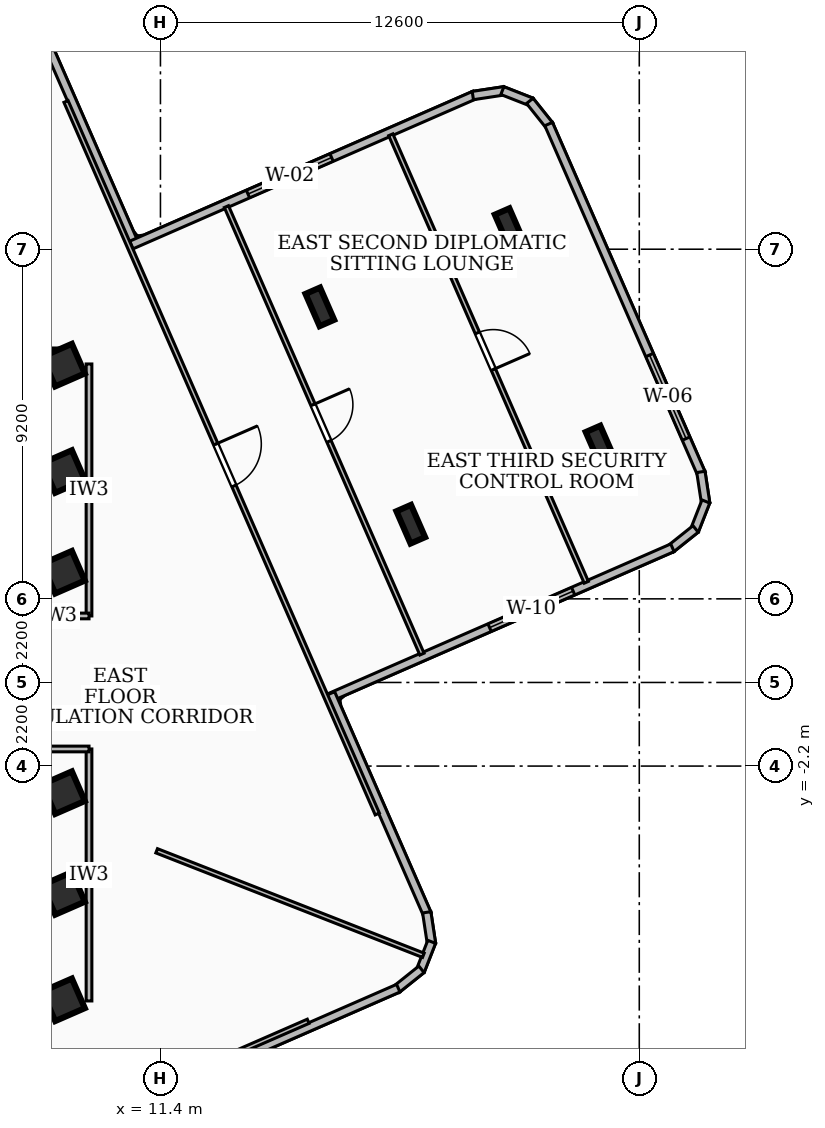
"""IFC4 building model, lengths in metres.
Left out: names, types, materials, properties, quantities, classifications, styles, units other than length and angle.
Written with IfcOpenShell. Run it as: python <this file> out.ifc"""

import sys

from ifc_helpers import new_model, si_unit, direction, frame, frame_2d, origin, origin_2d, place, context, subcontext, project, spatial, rectangle, i_section, extrude, element, fill, save


model = new_model("IFC4")
c1 = context("Model", 3, precision=1e-05, world=origin(), true_north=direction((0.0, 1.0)))
c2 = subcontext(c1, "Body", "Model", "MODEL_VIEW")
j1 = project(units=[si_unit("LENGTHUNIT", "METRE"), si_unit("PLANEANGLEUNIT", "RADIAN")], contexts=[c1])
p1 = place(None, origin())
s1 = spatial("IfcSite", under=j1, at=p1, CompositionType="ELEMENT")
p2 = place(p1, origin())
s2 = spatial("IfcBuilding", under=s1, at=p2, CompositionType="ELEMENT")
p3 = place(p2, frame((0.0, 0.0, 181.08)))
s3 = spatial("IfcBuildingStorey", under=s2, at=p3, CompositionType="ELEMENT", Elevation=181.08)
for number, where, z_axis, x_axis in (
    (1, (-8.78, 8.535, 0.0), (0.0, 0.0, 1.0), (1.0, 0.0, 0.0)),
    (2, (8.78, -8.535, 0.0), (0.0, 0.0, 1.0), (-1.0, 0.0, 0.0)),
):
    element("IfcWall", number, at=place(p3, frame(where, z_axis=z_axis, x_axis=x_axis)), inside=s3, PredefinedType="SHEAR", context=c2, shape_type="SweptSolid", body=[
        extrude(rectangle(XDim=17.56, YDim=0.45, at=frame_2d((8.78, 0.0))), origin(), (0.0, 0.0, 1.0), 3.34),
    ])
for number, where, z_axis, x_axis in (
    (3, (8.85, -5.55, 0.0), (0.0, 0.0, 1.0), (0.916, 0.4, 0.0)),
    (4, (8.85, -2.9, 0.0), (0.0, 0.0, 1.0), (0.916, 0.4, 0.0)),
    (5, (8.85, 2.9, 0.0), (0.0, 0.0, 1.0), (0.916, 0.4, 0.0)),
    (6, (8.85, 5.55, 0.0), (0.0, 0.0, 1.0), (0.916, 0.4, 0.0)),
    (7, (8.85, -8.35, 0.0), (0.0, 0.0, 1.0), (0.916, 0.4, 0.0)),
    (8, (8.85, 8.35, 0.0), (0.0, 0.0, 1.0), (0.916, 0.4, 0.0)),
):
    element("IfcColumn", number, at=place(p3, frame(where, z_axis=z_axis, x_axis=x_axis)), inside=s3, PredefinedType="COLUMN", context=c2, shape_type="SweptSolid", body=[
        extrude(rectangle(XDim=0.85, YDim=0.85, at=origin_2d()), origin(), (0.0, 0.0, 1.0), 3.6),
    ])
for number, where, z_axis, x_axis in (
    (9, (17.987, 4.164, 0.0), (0.0, 0.0, 1.0), (0.916, 0.4, 0.0)),
    (10, (15.594, 9.883, 0.0), (0.0, 0.0, 1.0), (0.916, 0.4, 0.0)),
    (11, (22.968, 6.248, 0.0), (0.0, 0.0, 1.0), (0.916, 0.4, 0.0)),
    (12, (20.576, 11.967, 0.0), (0.0, 0.0, 1.0), (0.916, 0.4, 0.0)),
):
    element("IfcColumn", number, at=place(p3, frame(where, z_axis=z_axis, x_axis=x_axis)), inside=s3, PredefinedType="COLUMN", context=c2, shape_type="SweptSolid", body=[
        extrude(i_section(OverallWidth=0.418, OverallDepth=0.927, WebThickness=0.019, FlangeThickness=0.032, at=origin_2d()), origin(), (0.0, 0.0, 1.0), 3.6),
    ])
p4 = place(p3, frame((8.044, 17.658, 0.0), z_axis=(0.0, 0.0, 1.0), x_axis=(0.400352658158, -0.916361145567, 0.0)))
e13 = element("IfcWall", 13, at=p4, inside=s3, PredefinedType="SOLIDWALL", context=c2, shape_type="SweptSolid", body=[
    extrude(rectangle(XDim=6.759, YDim=0.22, at=frame_2d((3.38, 0.0))), origin(), (0.0, 0.0, 1.0), 3.34),
])
p5 = place(p3, frame((10.634, 11.51, 0.0), z_axis=(0.0, 0.0, 1.0), x_axis=(0.916355581171, 0.400365394179, 0.0)))
e14 = element("IfcWall", 14, at=p5, inside=s3, PredefinedType="SOLIDWALL", context=c2, shape_type="SweptSolid", body=[
    extrude(rectangle(XDim=9.859, YDim=0.22, at=frame_2d((4.929, 0.0))), origin(), (0.0, 0.0, 1.0), 3.34),
])
p6 = place(p5, frame((3.35, 0.0, 0.85)))
e15 = element("IfcOpeningElement", 15, at=p6, cuts=e14, PredefinedType="OPENING", context=c2, shape_type="SweptSolid", body=[
    extrude(rectangle(XDim=2.4, YDim=2.1, at=frame_2d((1.2, 1.05))), frame((0.0, 0.12, 0.0), z_axis=(0.0, -1.0, 0.0), x_axis=(1.0, 0.0, 0.0)), (0.0, 0.0, 1.0), 0.24),
])
p7 = place(p3, frame((19.62, 15.443, 0.0), z_axis=(0.0, 0.0, 1.0), x_axis=(0.988714190876, 0.149814047271, 0.0)))
e16 = element("IfcWall", 16, at=p7, inside=s3, PredefinedType="SOLIDWALL", context=c2, shape_type="SweptSolid", body=[
    extrude(rectangle(XDim=0.834, YDim=0.22, at=frame_2d((0.417, 0.0))), origin(), (0.0, 0.0, 1.0), 3.34),
])
p8 = place(p3, frame((20.397, 15.573, 0.0), z_axis=(0.0, 0.0, 1.0), x_axis=(0.93086383185, -0.365366290938, 0.0)))
e17 = element("IfcWall", 17, at=p8, inside=s3, PredefinedType="SOLIDWALL", context=c2, shape_type="SweptSolid", body=[
    extrude(rectangle(XDim=0.819, YDim=0.22, at=frame_2d((0.409, 0.0))), origin(), (0.0, 0.0, 1.0), 3.34),
])
p9 = place(p3, frame((21.12, 15.303, 0.0), z_axis=(0.0, 0.0, 1.0), x_axis=(0.623625316731, -0.781723393747, 0.0)))
e18 = element("IfcWall", 18, at=p9, inside=s3, PredefinedType="SOLIDWALL", context=c2, shape_type="SweptSolid", body=[
    extrude(rectangle(XDim=0.835, YDim=0.22, at=frame_2d((0.418, 0.0))), origin(), (0.0, 0.0, 1.0), 3.34),
])
p10 = place(p3, frame((21.615, 14.693, 0.0), z_axis=(0.0, 0.0, 1.0), x_axis=(0.400359601754, -0.916358111921, 0.0)))
e19 = element("IfcWall", 19, at=p10, inside=s3, PredefinedType="SOLIDWALL", context=c2, shape_type="SweptSolid", body=[
    extrude(rectangle(XDim=10.041, YDim=0.22, at=frame_2d((5.021, 0.0))), origin(), (0.0, 0.0, 1.0), 3.34),
])
p11 = place(p10, frame((6.632, 0.0, 0.85)))
e20 = element("IfcOpeningElement", 20, at=p11, cuts=e19, PredefinedType="OPENING", context=c2, shape_type="SweptSolid", body=[
    extrude(rectangle(XDim=2.4, YDim=1.85, at=frame_2d((1.2, 0.925))), frame((0.0, 0.12, 0.0), z_axis=(0.0, -1.0, 0.0), x_axis=(1.0, 0.0, 0.0)), (0.0, 0.0, 1.0), 0.24),
])
p12 = place(p3, frame((25.621, 5.54, 0.0), z_axis=(0.0, 0.0, 1.0), x_axis=(0.150783469095, -0.988566813851, 0.0)))
e21 = element("IfcWall", 21, at=p12, inside=s3, PredefinedType="SOLIDWALL", context=c2, shape_type="SweptSolid", body=[
    extrude(rectangle(XDim=0.835, YDim=0.22, at=frame_2d((0.418, 0.0))), origin(), (0.0, 0.0, 1.0), 3.34),
])
p13 = place(p3, frame((25.752, 4.762, 0.0), z_axis=(0.0, 0.0, 1.0), x_axis=(-0.365366290938, -0.93086383185, 0.0)))
e22 = element("IfcWall", 22, at=p13, inside=s3, PredefinedType="SOLIDWALL", context=c2, shape_type="SweptSolid", body=[
    extrude(rectangle(XDim=0.819, YDim=0.22, at=frame_2d((0.409, 0.0))), origin(), (0.0, 0.0, 1.0), 3.34),
])
p14 = place(p3, frame((25.482, 4.039, 0.0), z_axis=(0.0, 0.0, 1.0), x_axis=(-0.781609702867, -0.62376780326, 0.0)))
e23 = element("IfcWall", 23, at=p14, inside=s3, PredefinedType="SOLIDWALL", context=c2, shape_type="SweptSolid", body=[
    extrude(rectangle(XDim=0.835, YDim=0.22, at=frame_2d((0.417, 0.0))), origin(), (0.0, 0.0, 1.0), 3.34),
])
p15 = place(p3, frame((24.872, 3.544, 0.0), z_axis=(0.0, 0.0, 1.0), x_axis=(-0.916375425493, -0.400319971464, 0.0)))
e24 = element("IfcWall", 24, at=p15, inside=s3, PredefinedType="SOLIDWALL", context=c2, shape_type="SweptSolid", body=[
    extrude(rectangle(XDim=9.86, YDim=0.22, at=frame_2d((4.93, 0.0))), origin(), (0.0, 0.0, 1.0), 3.34),
])
p16 = place(p15, frame((2.85, 0.0, 0.85)))
e25 = element("IfcOpeningElement", 25, at=p16, cuts=e24, PredefinedType="OPENING", context=c2, shape_type="SweptSolid", body=[
    extrude(rectangle(XDim=2.4, YDim=1.65, at=frame_2d((1.2, 0.825))), frame((0.0, 0.12, 0.0), z_axis=(0.0, -1.0, 0.0), x_axis=(1.0, 0.0, 0.0)), (0.0, 0.0, 1.0), 0.24),
])
p17 = place(p3, frame((15.883, -0.287, 0.0), z_axis=(0.0, 0.0, 1.0), x_axis=(0.400352069216, -0.916361402872, 0.0)))
e26 = element("IfcWall", 26, at=p17, inside=s3, PredefinedType="SOLIDWALL", context=c2, shape_type="SweptSolid", body=[
    extrude(rectangle(XDim=6.339, YDim=0.22, at=frame_2d((3.169, 0.0))), origin(), (0.0, 0.0, 1.0), 3.34),
])
p18 = place(p3, frame((18.407, -6.048, 0.0), z_axis=(0.0, 0.0, 1.0), x_axis=(0.149814047271, -0.988714190876, 0.0)))
e27 = element("IfcWall", 27, at=p18, inside=s3, PredefinedType="SOLIDWALL", context=c2, shape_type="SweptSolid", body=[
    extrude(rectangle(XDim=0.834, YDim=0.22, at=frame_2d((0.417, 0.0))), origin(), (0.0, 0.0, 1.0), 3.34),
])
p19 = place(p3, frame((18.537, -6.825, 0.0), z_axis=(0.0, 0.0, 1.0), x_axis=(-0.364331843435, -0.931269191941, 0.0)))
e28 = element("IfcWall", 28, at=p19, inside=s3, PredefinedType="SOLIDWALL", context=c2, shape_type="SweptSolid", body=[
    extrude(rectangle(XDim=0.818, YDim=0.22, at=frame_2d((0.409, 0.0))), origin(), (0.0, 0.0, 1.0), 3.34),
])
p20 = place(p3, frame((18.268, -7.548, 0.0), z_axis=(0.0, 0.0, 1.0), x_axis=(-0.781153625844, -0.624338860581, 0.0)))
e29 = element("IfcWall", 29, at=p20, inside=s3, PredefinedType="SOLIDWALL", context=c2, shape_type="SweptSolid", body=[
    extrude(rectangle(XDim=0.836, YDim=0.22, at=frame_2d((0.418, 0.0))), origin(), (0.0, 0.0, 1.0), 3.34),
])
p21 = place(p3, frame((17.658, -8.044, 0.0), z_axis=(0.0, 0.0, 1.0), x_axis=(-0.916361145567, -0.400352658158, 0.0)))
e30 = element("IfcWall", 30, at=p21, inside=s3, PredefinedType="SOLIDWALL", context=c2, shape_type="SweptSolid", body=[
    extrude(rectangle(XDim=6.759, YDim=0.22, at=frame_2d((3.38, 0.0))), origin(), (0.0, 0.0, 1.0), 3.34),
])
p22 = place(p3, frame((9.52, 1.75, 0.0), z_axis=(0.0, 0.0, 1.0), x_axis=(0.0, 1.0, 0.0)))
e31 = element("IfcWall", 31, at=p22, inside=s3, PredefinedType="PARTITIONING", context=c2, shape_type="SweptSolid", body=[
    extrude(rectangle(XDim=6.63, YDim=0.15, at=frame_2d((3.315, 0.0))), origin(), (0.0, 0.0, 1.0), 2.644),
])
p23 = place(p3, frame((7.85, 1.75, 0.0), z_axis=(0.0, 0.0, 1.0), x_axis=(1.0, 0.0, 0.0)))
e32 = element("IfcWall", 32, at=p23, inside=s3, PredefinedType="PARTITIONING", context=c2, shape_type="SweptSolid", body=[
    extrude(rectangle(XDim=1.67, YDim=0.15, at=frame_2d((0.835, 0.0))), origin(), (0.0, 0.0, 1.0), 2.57),
])
p24 = place(p3, frame((9.52, -8.38, 0.0), z_axis=(0.0, 0.0, 1.0), x_axis=(0.0, 1.0, 0.0)))
e33 = element("IfcWall", 33, at=p24, inside=s3, PredefinedType="PARTITIONING", context=c2, shape_type="SweptSolid", body=[
    extrude(rectangle(XDim=6.63, YDim=0.15, at=frame_2d((3.315, 0.0))), origin(), (0.0, 0.0, 1.0), 3.34),
])
p25 = place(p3, frame((7.85, -1.75, 0.0), z_axis=(0.0, 0.0, 1.0), x_axis=(1.0, 0.0, 0.0)))
e34 = element("IfcWall", 34, at=p25, inside=s3, PredefinedType="PARTITIONING", context=c2, shape_type="SweptSolid", body=[
    extrude(rectangle(XDim=1.67, YDim=0.15, at=frame_2d((0.835, 0.0))), origin(), (0.0, 0.0, 1.0), 2.57),
])
p26 = place(p3, frame((11.3, -4.429, 0.0), z_axis=(0.0, 0.0, 1.0), x_axis=(0.931071596241, -0.364836514995, 0.0)))
e35 = element("IfcWall", 35, at=p26, inside=s3, PredefinedType="PARTITIONING", context=c2, shape_type="SweptSolid", body=[
    extrude(rectangle(XDim=7.538, YDim=0.12, at=frame_2d((3.769, 0.0))), origin(), (0.0, 0.0, 1.0), 3.34),
])
p27 = place(p3, frame((8.915, 15.288, 0.0), z_axis=(0.0, 0.0, 1.0), x_axis=(0.400335531383, -0.916368627962, 0.0)))
e36 = element("IfcWall", 36, at=p27, inside=s3, PredefinedType="PARTITIONING", context=c2, shape_type="SweptSolid", body=[
    extrude(rectangle(XDim=20.46, YDim=0.12, at=frame_2d((10.23, 0.0))), origin(), (0.0, 0.0, 1.0), 2.644),
])
p28 = place(p27, frame((9.84, 0.0, 0.0)))
e37 = element("IfcOpeningElement", 37, at=p28, cuts=e36, PredefinedType="OPENING", context=c2, shape_type="SweptSolid", body=[
    extrude(rectangle(XDim=1.2, YDim=2.1, at=frame_2d((0.6, 1.05))), frame((0.0, 0.07, 0.0), z_axis=(0.0, -1.0, 0.0), x_axis=(1.0, 0.0, 0.0)), (0.0, 0.0, 1.0), 0.14),
])
p29 = place(p3, frame((13.136, 12.521, 0.0), z_axis=(0.0, 0.0, 1.0), x_axis=(0.400394200209, -0.916342994974, 0.0)))
e38 = element("IfcWall", 38, at=p29, inside=s3, PredefinedType="PARTITIONING", context=c2, shape_type="SweptSolid", body=[
    extrude(rectangle(XDim=12.85, YDim=0.12, at=frame_2d((6.425, 0.0))), origin(), (0.0, 0.0, 1.0), 2.644),
])
p30 = place(p29, frame((5.69, 0.0, 0.0)))
e39 = element("IfcOpeningElement", 39, at=p30, cuts=e38, PredefinedType="OPENING", context=c2, shape_type="SweptSolid", body=[
    extrude(rectangle(XDim=1.05, YDim=2.08, at=frame_2d((0.525, 1.04))), frame((0.0, 0.07, 0.0), z_axis=(0.0, -1.0, 0.0), x_axis=(1.0, 0.0, 0.0)), (0.0, 0.0, 1.0), 0.14),
])
p31 = place(p3, frame((17.461, 14.411, 0.0), z_axis=(0.0, 0.0, 1.0), x_axis=(0.400394200209, -0.916342994974, 0.0)))
e40 = element("IfcWall", 40, at=p31, inside=s3, PredefinedType="PARTITIONING", context=c2, shape_type="SweptSolid", body=[
    extrude(rectangle(XDim=12.85, YDim=0.12, at=frame_2d((6.425, 0.0))), origin(), (0.0, 0.0, 1.0), 2.644),
])
p32 = place(p31, frame((5.69, 0.0, 0.0)))
e41 = element("IfcOpeningElement", 41, at=p32, cuts=e40, PredefinedType="OPENING", context=c2, shape_type="SweptSolid", body=[
    extrude(rectangle(XDim=1.05, YDim=2.08, at=frame_2d((0.525, 1.04))), frame((0.0, 0.07, 0.0), z_axis=(0.0, -1.0, 0.0), x_axis=(1.0, 0.0, 0.0)), (0.0, 0.0, 1.0), 0.14),
])
p33 = place(p3, frame((15.288, -8.915, 0.0), z_axis=(0.0, 0.0, 1.0), x_axis=(-0.916368627962, -0.400335531383, 0.0)))
e42 = element("IfcWall", 42, at=p33, inside=s3, PredefinedType="PARTITIONING", context=c2, shape_type="SweptSolid", body=[
    extrude(rectangle(XDim=20.46, YDim=0.12, at=frame_2d((10.23, 0.0))), origin(), (0.0, 0.0, 1.0), 2.644),
])
p34 = place(p33, frame((9.84, 0.0, 0.0)))
e43 = element("IfcOpeningElement", 43, at=p34, cuts=e42, PredefinedType="OPENING", context=c2, shape_type="SweptSolid", body=[
    extrude(rectangle(XDim=1.2, YDim=2.1, at=frame_2d((0.6, 1.05))), frame((0.0, 0.07, 0.0), z_axis=(0.0, -1.0, 0.0), x_axis=(1.0, 0.0, 0.0)), (0.0, 0.0, 1.0), 0.14),
])
p35 = place(p6, origin())
e44 = element("IfcWindow", 44, at=p35, inside=s3, PartitioningType="SINGLE_PANEL", PredefinedType="WINDOW", context=c2, shape_type="SweptSolid", body=[
    extrude(rectangle(XDim=2.4, YDim=2.1, at=frame_2d((1.2, 1.05))), frame((0.0, 0.03, 0.0), z_axis=(0.0, -1.0, 0.0), x_axis=(1.0, 0.0, 0.0)), (0.0, 0.0, 1.0), 0.06),
])
fill(e15, e44)
p36 = place(p11, origin())
e45 = element("IfcWindow", 45, at=p36, inside=s3, PartitioningType="SINGLE_PANEL", PredefinedType="WINDOW", context=c2, shape_type="SweptSolid", body=[
    extrude(rectangle(XDim=2.4, YDim=1.85, at=frame_2d((1.2, 0.925))), frame((0.0, 0.03, 0.0), z_axis=(0.0, -1.0, 0.0), x_axis=(1.0, 0.0, 0.0)), (0.0, 0.0, 1.0), 0.06),
])
fill(e20, e45)
p37 = place(p16, origin())
e46 = element("IfcWindow", 46, at=p37, inside=s3, PartitioningType="SINGLE_PANEL", PredefinedType="WINDOW", context=c2, shape_type="SweptSolid", body=[
    extrude(rectangle(XDim=2.4, YDim=1.65, at=frame_2d((1.2, 0.825))), frame((0.0, 0.03, 0.0), z_axis=(0.0, -1.0, 0.0), x_axis=(1.0, 0.0, 0.0)), (0.0, 0.0, 1.0), 0.06),
])
fill(e25, e46)
p38 = place(p28, origin())
e47 = element("IfcDoor", 47, at=p38, inside=s3, OperationType="SINGLE_SWING_LEFT", PredefinedType="DOOR", context=c2, shape_type="SweptSolid", body=[
    extrude(rectangle(XDim=1.2, YDim=2.1, at=frame_2d((0.6, 1.05))), frame((0.0, 0.025, 0.0), z_axis=(0.0, -1.0, 0.0), x_axis=(1.0, 0.0, 0.0)), (0.0, 0.0, 1.0), 0.05),
])
fill(e37, e47)
p39 = place(p30, origin())
e48 = element("IfcDoor", 48, at=p39, inside=s3, OperationType="SINGLE_SWING_LEFT", PredefinedType="DOOR", context=c2, shape_type="SweptSolid", body=[
    extrude(rectangle(XDim=1.05, YDim=2.08, at=frame_2d((0.525, 1.04))), frame((0.0, 0.025, 0.0), z_axis=(0.0, -1.0, 0.0), x_axis=(1.0, 0.0, 0.0)), (0.0, 0.0, 1.0), 0.05),
])
fill(e39, e48)
p40 = place(p32, origin())
e49 = element("IfcDoor", 49, at=p40, inside=s3, OperationType="SINGLE_SWING_RIGHT", PredefinedType="DOOR", context=c2, shape_type="SweptSolid", body=[
    extrude(rectangle(XDim=1.05, YDim=2.08, at=frame_2d((0.525, 1.04))), frame((0.0, 0.025, 0.0), z_axis=(0.0, -1.0, 0.0), x_axis=(1.0, 0.0, 0.0)), (0.0, 0.0, 1.0), 0.05),
])
fill(e41, e49)
save(model, sys.argv[1])
